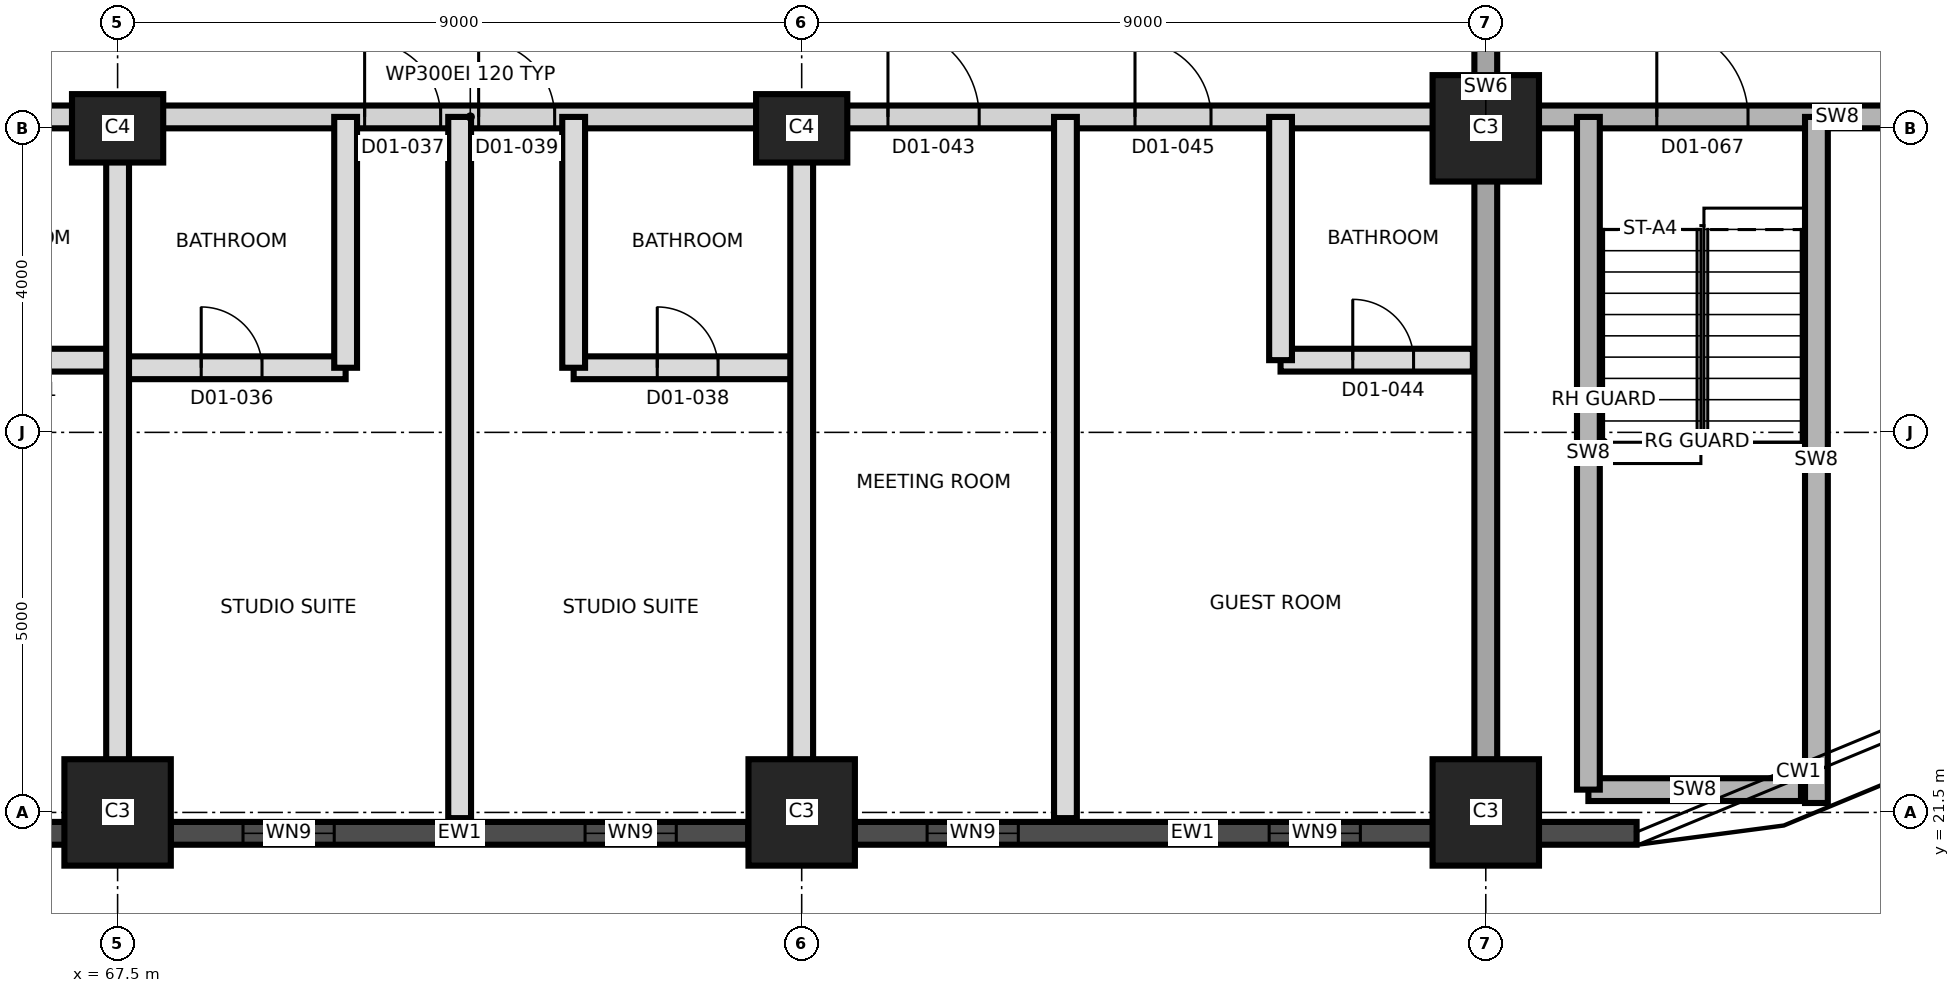
"""IFC4 building model, lengths in metres.
Left out: names, types, materials, properties, quantities, classifications, styles, units other than length and angle.
Written with IfcOpenShell. Run it as: python <this file> out.ifc"""

import sys

from ifc_helpers import new_model, si_unit, direction, frame, frame_2d, origin, origin_2d, place, context, subcontext, project, spatial, rectangle, extrude, element, fill, save


model = new_model("IFC4")
c1 = context("Model", 3, precision=1e-05, world=origin(), true_north=direction((0.0, 1.0)))
c2 = subcontext(c1, "Body", "Model", "MODEL_VIEW")
j1 = project(units=[si_unit("LENGTHUNIT", "METRE"), si_unit("PLANEANGLEUNIT", "RADIAN")], contexts=[c1])
p1 = place(None, origin())
s1 = spatial("IfcSite", under=j1, at=p1, CompositionType="ELEMENT")
p2 = place(p1, origin())
s2 = spatial("IfcBuilding", under=s1, at=p2, CompositionType="ELEMENT")
p3 = place(p2, frame((0.0, 0.0, 37.2)))
s3 = spatial("IfcBuildingStorey", under=s2, at=p3, CompositionType="ELEMENT", Elevation=37.2)
for number, where, z_axis, x_axis in (
    (1, (67.5, 21.5, 0.0), (0.0, 0.0, 1.0), (1.0, 0.0, 0.0)),
    (2, (76.5, 21.5, 0.0), (0.0, 0.0, 1.0), (1.0, 0.0, 0.0)),
    (3, (85.5, 21.5, 0.0), (0.0, 0.0, 1.0), (1.0, 0.0, 0.0)),
):
    element("IfcColumn", number, at=place(p3, frame(where, z_axis=z_axis, x_axis=x_axis)), inside=s3, PredefinedType="COLUMN", context=c2, shape_type="SweptSolid", body=[
        extrude(rectangle(XDim=1.4, YDim=1.4, at=origin_2d()), origin(), (0.0, 0.0, 1.0), 3.7),
    ])
for number, where, z_axis, x_axis in (
    (4, (67.5, 30.5, 0.0), (0.0, 0.0, 1.0), (1.0, 0.0, 0.0)),
    (5, (76.5, 30.5, 0.0), (0.0, 0.0, 1.0), (1.0, 0.0, 0.0)),
):
    element("IfcColumn", number, at=place(p3, frame(where, z_axis=z_axis, x_axis=x_axis)), inside=s3, PredefinedType="COLUMN", context=c2, shape_type="SweptSolid", body=[
        extrude(rectangle(XDim=1.2, YDim=0.9, at=origin_2d()), origin(), (0.0, 0.0, 1.0), 3.7),
    ])
p4 = place(p3, frame((85.5, 30.5, 0.0), z_axis=(0.0, 0.0, 1.0), x_axis=(1.0, 0.0, 0.0)))
e6 = element("IfcColumn", 6, at=p4, inside=s3, PredefinedType="COLUMN", context=c2, shape_type="SweptSolid", body=[
    extrude(rectangle(XDim=1.4, YDim=1.4, at=origin_2d()), origin(), (0.0, 0.0, 1.0), 3.7),
])
p5 = place(p3, frame((85.5, 21.425, 0.0), z_axis=(0.0, 0.0, 1.0), x_axis=(0.0, 1.0, 0.0)))
e7 = element("IfcWall", 7, at=p5, inside=s3, PredefinedType="SHEAR", context=c2, shape_type="SweptSolid", body=[
    extrude(rectangle(XDim=18.15, YDim=0.3, at=frame_2d((9.075, 0.0))), origin(), (0.0, 0.0, 1.0), 3.7),
])
p6 = place(p5, frame((10.275, 0.0, 0.0)))
e8 = element("IfcOpeningElement", 8, at=p6, cuts=e7, PredefinedType="OPENING", context=c2, shape_type="SweptSolid", body=[
    extrude(rectangle(XDim=1.4, YDim=2.1, at=frame_2d((0.7, 1.05))), frame((0.0, 0.16, 0.0), z_axis=(0.0, -1.0, 0.0), x_axis=(1.0, 0.0, 0.0)), (0.0, 0.0, 1.0), 0.32),
])
p7 = place(p3, frame((59.207, 21.225, 0.0), z_axis=(0.0, 0.0, 1.0), x_axis=(1.0, 0.0, 0.0)))
e9 = element("IfcWall", 9, at=p7, inside=s3, PredefinedType="SOLIDWALL", context=c2, shape_type="SweptSolid", body=[
    extrude(rectangle(XDim=8.993, YDim=0.3, at=frame_2d((4.497, 0.0))), origin(), (0.0, 0.0, 1.0), 3.4),
])
p8 = place(p7, frame((0.997, 0.0, 0.3)))
e10 = element("IfcOpeningElement", 10, at=p8, cuts=e9, PredefinedType="OPENING", context=c2, shape_type="SweptSolid", body=[
    extrude(rectangle(XDim=1.8, YDim=2.4, at=frame_2d((0.9, 1.2))), frame((0.0, 0.16, 0.0), z_axis=(0.0, -1.0, 0.0), x_axis=(1.0, 0.0, 0.0)), (0.0, 0.0, 1.0), 0.32),
])
p9 = place(p7, frame((5.443, 0.0, 0.9)))
e11 = element("IfcOpeningElement", 11, at=p9, cuts=e9, PredefinedType="OPENING", context=c2, shape_type="SweptSolid", body=[
    extrude(rectangle(XDim=1.2, YDim=1.5, at=frame_2d((0.6, 0.75))), frame((0.0, 0.16, 0.0), z_axis=(0.0, -1.0, 0.0), x_axis=(1.0, 0.0, 0.0)), (0.0, 0.0, 1.0), 0.32),
])
p10 = place(p3, frame((68.2, 21.225, 0.0), z_axis=(0.0, 0.0, 1.0), x_axis=(1.0, 0.0, 0.0)))
e12 = element("IfcWall", 12, at=p10, inside=s3, PredefinedType="SOLIDWALL", context=c2, shape_type="SweptSolid", body=[
    extrude(rectangle(XDim=7.6, YDim=0.3, at=frame_2d((3.8, 0.0))), origin(), (0.0, 0.0, 1.0), 2.7),
])
p11 = place(p10, frame((0.95, 0.0, 0.9)))
e13 = element("IfcOpeningElement", 13, at=p11, cuts=e12, PredefinedType="OPENING", context=c2, shape_type="SweptSolid", body=[
    extrude(rectangle(XDim=1.2, YDim=1.5, at=frame_2d((0.6, 0.75))), frame((0.0, 0.16, 0.0), z_axis=(0.0, -1.0, 0.0), x_axis=(1.0, 0.0, 0.0)), (0.0, 0.0, 1.0), 0.32),
])
p12 = place(p10, frame((5.45, 0.0, 0.9)))
e14 = element("IfcOpeningElement", 14, at=p12, cuts=e12, PredefinedType="OPENING", context=c2, shape_type="SweptSolid", body=[
    extrude(rectangle(XDim=1.2, YDim=1.5, at=frame_2d((0.6, 0.75))), frame((0.0, 0.16, 0.0), z_axis=(0.0, -1.0, 0.0), x_axis=(1.0, 0.0, 0.0)), (0.0, 0.0, 1.0), 0.32),
])
p13 = place(p3, frame((75.8, 21.225, 0.0), z_axis=(0.0, 0.0, 1.0), x_axis=(1.0, 0.0, 0.0)))
e15 = element("IfcWall", 15, at=p13, inside=s3, PredefinedType="SOLIDWALL", context=c2, shape_type="SweptSolid", body=[
    extrude(rectangle(XDim=11.684, YDim=0.3, at=frame_2d((5.842, 0.0))), origin(), (0.0, 0.0, 1.0), 3.4),
])
p14 = place(p13, frame((2.35, 0.0, 0.9)))
e16 = element("IfcOpeningElement", 16, at=p14, cuts=e15, PredefinedType="OPENING", context=c2, shape_type="SweptSolid", body=[
    extrude(rectangle(XDim=1.2, YDim=1.5, at=frame_2d((0.6, 0.75))), frame((0.0, 0.16, 0.0), z_axis=(0.0, -1.0, 0.0), x_axis=(1.0, 0.0, 0.0)), (0.0, 0.0, 1.0), 0.32),
])
p15 = place(p13, frame((6.85, 0.0, 0.9)))
e17 = element("IfcOpeningElement", 17, at=p15, cuts=e15, PredefinedType="OPENING", context=c2, shape_type="SweptSolid", body=[
    extrude(rectangle(XDim=1.2, YDim=1.5, at=frame_2d((0.6, 0.75))), frame((0.0, 0.16, 0.0), z_axis=(0.0, -1.0, 0.0), x_axis=(1.0, 0.0, 0.0)), (0.0, 0.0, 1.0), 0.32),
])
p16 = place(p3, frame((86.85, 21.8, 0.0), z_axis=(0.0, 0.0, 1.0), x_axis=(1.0, 0.0, 0.0)))
e18 = element("IfcWall", 18, at=p16, inside=s3, PredefinedType="SHEAR", context=c2, shape_type="SweptSolid", body=[
    extrude(rectangle(XDim=2.797, YDim=0.3, at=frame_2d((1.398, 0.0))), origin(), (0.0, 0.0, 1.0), 3.4),
])
p17 = place(p3, frame((67.5, 27.35, 0.0), z_axis=(0.0, 0.0, 1.0), x_axis=(1.0, 0.0, 0.0)))
e19 = element("IfcWall", 19, at=p17, inside=s3, PredefinedType="PARTITIONING", context=c2, shape_type="SweptSolid", body=[
    extrude(rectangle(XDim=3.0, YDim=0.3, at=frame_2d((1.5, 0.0))), origin(), (0.0, 0.0, 1.0), 3.4),
])
p18 = place(p17, frame((1.1, 0.0, 0.0)))
e20 = element("IfcOpeningElement", 20, at=p18, cuts=e19, PredefinedType="OPENING", context=c2, shape_type="SweptSolid", body=[
    extrude(rectangle(XDim=0.8, YDim=2.1, at=frame_2d((0.4, 1.05))), frame((0.0, 0.16, 0.0), z_axis=(0.0, -1.0, 0.0), x_axis=(1.0, 0.0, 0.0)), (0.0, 0.0, 1.0), 0.32),
])
p19 = place(p3, frame((73.5, 27.35, 0.0), z_axis=(0.0, 0.0, 1.0), x_axis=(1.0, 0.0, 0.0)))
e21 = element("IfcWall", 21, at=p19, inside=s3, PredefinedType="PARTITIONING", context=c2, shape_type="SweptSolid", body=[
    extrude(rectangle(XDim=3.0, YDim=0.3, at=frame_2d((1.5, 0.0))), origin(), (0.0, 0.0, 1.0), 3.4),
])
p20 = place(p19, frame((1.1, 0.0, 0.0)))
e22 = element("IfcOpeningElement", 22, at=p20, cuts=e21, PredefinedType="OPENING", context=c2, shape_type="SweptSolid", body=[
    extrude(rectangle(XDim=0.8, YDim=2.1, at=frame_2d((0.4, 1.05))), frame((0.0, 0.16, 0.0), z_axis=(0.0, -1.0, 0.0), x_axis=(1.0, 0.0, 0.0)), (0.0, 0.0, 1.0), 0.32),
])
p21 = place(p3, frame((64.8, 27.45, 0.0), z_axis=(0.0, 0.0, 1.0), x_axis=(1.0, 0.0, 0.0)))
e23 = element("IfcWall", 23, at=p21, inside=s3, PredefinedType="PARTITIONING", context=c2, shape_type="SweptSolid", body=[
    extrude(rectangle(XDim=2.7, YDim=0.3, at=frame_2d((1.35, 0.0))), origin(), (0.0, 0.0, 1.0), 3.4),
])
p22 = place(p21, frame((0.95, 0.0, 0.0)))
e24 = element("IfcOpeningElement", 24, at=p22, cuts=e23, PredefinedType="OPENING", context=c2, shape_type="SweptSolid", body=[
    extrude(rectangle(XDim=0.8, YDim=2.1, at=frame_2d((0.4, 1.05))), frame((0.0, 0.16, 0.0), z_axis=(0.0, -1.0, 0.0), x_axis=(1.0, 0.0, 0.0)), (0.0, 0.0, 1.0), 0.32),
])
p23 = place(p3, frame((82.8, 27.45, 0.0), z_axis=(0.0, 0.0, 1.0), x_axis=(1.0, 0.0, 0.0)))
e25 = element("IfcWall", 25, at=p23, inside=s3, PredefinedType="PARTITIONING", context=c2, shape_type="SweptSolid", body=[
    extrude(rectangle(XDim=2.53, YDim=0.3, at=frame_2d((1.265, 0.0))), origin(), (0.0, 0.0, 1.0), 3.4),
])
p24 = place(p23, frame((0.95, 0.0, 0.0)))
e26 = element("IfcOpeningElement", 26, at=p24, cuts=e25, PredefinedType="OPENING", context=c2, shape_type="SweptSolid", body=[
    extrude(rectangle(XDim=0.8, YDim=2.1, at=frame_2d((0.4, 1.05))), frame((0.0, 0.16, 0.0), z_axis=(0.0, -1.0, 0.0), x_axis=(1.0, 0.0, 0.0)), (0.0, 0.0, 1.0), 0.32),
])
p25 = place(p3, frame((58.95, 30.65, 0.0), z_axis=(0.0, 0.0, 1.0), x_axis=(1.0, 0.0, 0.0)))
e27 = element("IfcWall", 27, at=p25, inside=s3, PredefinedType="PARTITIONING", context=c2, shape_type="SweptSolid", body=[
    extrude(rectangle(XDim=26.38, YDim=0.3, at=frame_2d((13.19, 0.0))), origin(), (0.0, 0.0, 1.0), 3.4),
])
p26 = place(p25, frame((2.47, 0.0, 0.0)))
e28 = element("IfcOpeningElement", 28, at=p26, cuts=e27, PredefinedType="OPENING", context=c2, shape_type="SweptSolid", body=[
    extrude(rectangle(XDim=1.0, YDim=2.1, at=frame_2d((0.5, 1.05))), frame((0.0, 0.16, 0.0), z_axis=(0.0, -1.0, 0.0), x_axis=(1.0, 0.0, 0.0)), (0.0, 0.0, 1.0), 0.32),
])
p27 = place(p25, frame((4.27, 0.0, 0.0)))
e29 = element("IfcOpeningElement", 29, at=p27, cuts=e27, PredefinedType="OPENING", context=c2, shape_type="SweptSolid", body=[
    extrude(rectangle(XDim=1.0, YDim=2.1, at=frame_2d((0.5, 1.05))), frame((0.0, 0.16, 0.0), z_axis=(0.0, -1.0, 0.0), x_axis=(1.0, 0.0, 0.0)), (0.0, 0.0, 1.0), 0.32),
])
p28 = place(p25, frame((11.8, 0.0, 0.0)))
e30 = element("IfcOpeningElement", 30, at=p28, cuts=e27, PredefinedType="OPENING", context=c2, shape_type="SweptSolid", body=[
    extrude(rectangle(XDim=1.0, YDim=2.4, at=frame_2d((0.5, 1.2))), frame((0.0, 0.16, 0.0), z_axis=(0.0, -1.0, 0.0), x_axis=(1.0, 0.0, 0.0)), (0.0, 0.0, 1.0), 0.32),
])
p29 = place(p25, frame((13.3, 0.0, 0.0)))
e31 = element("IfcOpeningElement", 31, at=p29, cuts=e27, PredefinedType="OPENING", context=c2, shape_type="SweptSolid", body=[
    extrude(rectangle(XDim=1.0, YDim=2.4, at=frame_2d((0.5, 1.2))), frame((0.0, 0.16, 0.0), z_axis=(0.0, -1.0, 0.0), x_axis=(1.0, 0.0, 0.0)), (0.0, 0.0, 1.0), 0.32),
])
p30 = place(p25, frame((18.685, 0.0, 0.0)))
e32 = element("IfcOpeningElement", 32, at=p30, cuts=e27, PredefinedType="OPENING", context=c2, shape_type="SweptSolid", body=[
    extrude(rectangle(XDim=1.2, YDim=2.1, at=frame_2d((0.6, 1.05))), frame((0.0, 0.16, 0.0), z_axis=(0.0, -1.0, 0.0), x_axis=(1.0, 0.0, 0.0)), (0.0, 0.0, 1.0), 0.32),
])
p31 = place(p25, frame((21.935, 0.0, 0.0)))
e33 = element("IfcOpeningElement", 33, at=p31, cuts=e27, PredefinedType="OPENING", context=c2, shape_type="SweptSolid", body=[
    extrude(rectangle(XDim=1.0, YDim=2.1, at=frame_2d((0.5, 1.05))), frame((0.0, 0.16, 0.0), z_axis=(0.0, -1.0, 0.0), x_axis=(1.0, 0.0, 0.0)), (0.0, 0.0, 1.0), 0.32),
])
p32 = place(p3, frame((85.67, 30.65, 0.0), z_axis=(0.0, 0.0, 1.0), x_axis=(1.0, 0.0, 0.0)))
e34 = element("IfcWall", 34, at=p32, inside=s3, PredefinedType="SHEAR", context=c2, shape_type="SweptSolid", body=[
    extrude(rectangle(XDim=8.905, YDim=0.3, at=frame_2d((4.453, 0.0))), origin(), (0.0, 0.0, 1.0), 3.4),
])
p33 = place(p32, frame((2.08, 0.0, 0.0)))
e35 = element("IfcOpeningElement", 35, at=p33, cuts=e34, PredefinedType="OPENING", context=c2, shape_type="SweptSolid", body=[
    extrude(rectangle(XDim=1.2, YDim=2.1, at=frame_2d((0.6, 1.05))), frame((0.0, 0.16, 0.0), z_axis=(0.0, -1.0, 0.0), x_axis=(1.0, 0.0, 0.0)), (0.0, 0.0, 1.0), 0.32),
])
p34 = place(p32, frame((5.63, 0.0, 0.0)))
e36 = element("IfcOpeningElement", 36, at=p34, cuts=e34, PredefinedType="OPENING", context=c2, shape_type="SweptSolid", body=[
    extrude(rectangle(XDim=1.0, YDim=2.1, at=frame_2d((0.5, 1.05))), frame((0.0, 0.16, 0.0), z_axis=(0.0, -1.0, 0.0), x_axis=(1.0, 0.0, 0.0)), (0.0, 0.0, 1.0), 0.32),
])
p35 = place(p3, frame((67.5, 21.425, 0.0), z_axis=(0.0, 0.0, 1.0), x_axis=(0.0, 1.0, 0.0)))
e37 = element("IfcWall", 37, at=p35, inside=s3, PredefinedType="PARTITIONING", context=c2, shape_type="SweptSolid", body=[
    extrude(rectangle(XDim=9.225, YDim=0.3, at=frame_2d((4.612, 0.0))), origin(), (0.0, 0.0, 1.0), 3.4),
])
p36 = place(p3, frame((70.5, 27.35, 0.0), z_axis=(0.0, 0.0, 1.0), x_axis=(0.0, 1.0, 0.0)))
e38 = element("IfcWall", 38, at=p36, inside=s3, PredefinedType="PARTITIONING", context=c2, shape_type="SweptSolid", body=[
    extrude(rectangle(XDim=3.3, YDim=0.3, at=frame_2d((1.65, 0.0))), origin(), (0.0, 0.0, 1.0), 3.4),
])
p37 = place(p3, frame((72.0, 21.425, 0.0), z_axis=(0.0, 0.0, 1.0), x_axis=(0.0, 1.0, 0.0)))
e39 = element("IfcWall", 39, at=p37, inside=s3, PredefinedType="PARTITIONING", context=c2, shape_type="SweptSolid", body=[
    extrude(rectangle(XDim=9.225, YDim=0.3, at=frame_2d((4.612, 0.0))), origin(), (0.0, 0.0, 1.0), 3.4),
])
p38 = place(p3, frame((73.5, 27.35, 0.0), z_axis=(0.0, 0.0, 1.0), x_axis=(0.0, 1.0, 0.0)))
e40 = element("IfcWall", 40, at=p38, inside=s3, PredefinedType="PARTITIONING", context=c2, shape_type="SweptSolid", body=[
    extrude(rectangle(XDim=3.3, YDim=0.3, at=frame_2d((1.65, 0.0))), origin(), (0.0, 0.0, 1.0), 3.4),
])
for number, where, z_axis, x_axis in (
    (41, (76.5, 21.425, 0.0), (0.0, 0.0, 1.0), (0.0, 1.0, 0.0)),
    (42, (79.97, 21.425, 0.0), (0.0, 0.0, 1.0), (0.0, 1.0, 0.0)),
):
    element("IfcWall", number, at=place(p3, frame(where, z_axis=z_axis, x_axis=x_axis)), inside=s3, PredefinedType="PARTITIONING", context=c2, shape_type="SweptSolid", body=[
        extrude(rectangle(XDim=9.225, YDim=0.3, at=frame_2d((4.612, 0.0))), origin(), (0.0, 0.0, 1.0), 3.4),
    ])
p39 = place(p3, frame((82.8, 27.45, 0.0), z_axis=(0.0, 0.0, 1.0), x_axis=(0.0, 1.0, 0.0)))
e43 = element("IfcWall", 43, at=p39, inside=s3, PredefinedType="PARTITIONING", context=c2, shape_type="SweptSolid", body=[
    extrude(rectangle(XDim=3.2, YDim=0.3, at=frame_2d((1.6, 0.0))), origin(), (0.0, 0.0, 1.0), 3.4),
])
p40 = place(p3, frame((86.85, 21.8, 0.0), z_axis=(0.0, 0.0, 1.0), x_axis=(0.0, 1.0, 0.0)))
e44 = element("IfcWall", 44, at=p40, inside=s3, PredefinedType="SHEAR", context=c2, shape_type="SweptSolid", body=[
    extrude(rectangle(XDim=8.85, YDim=0.3, at=frame_2d((4.425, 0.0))), origin(), (0.0, 0.0, 1.0), 3.4),
])
p41 = place(p3, frame((89.85, 21.624, 0.0), z_axis=(0.0, 0.0, 1.0), x_axis=(0.0, 1.0, 0.0)))
e45 = element("IfcWall", 45, at=p41, inside=s3, PredefinedType="SHEAR", context=c2, shape_type="SweptSolid", body=[
    extrude(rectangle(XDim=9.026, YDim=0.3, at=frame_2d((4.513, 0.0))), origin(), (0.0, 0.0, 1.0), 3.4),
])
p42 = place(p11, origin())
e46 = element("IfcWindow", 46, at=p42, inside=s3, PartitioningType="SINGLE_PANEL", PredefinedType="WINDOW", context=c2, shape_type="SweptSolid", body=[
    extrude(rectangle(XDim=1.2, YDim=1.5, at=frame_2d((0.6, 0.75))), frame((0.0, 0.03, 0.0), z_axis=(0.0, -1.0, 0.0), x_axis=(1.0, 0.0, 0.0)), (0.0, 0.0, 1.0), 0.06),
])
fill(e13, e46)
p43 = place(p12, origin())
e47 = element("IfcWindow", 47, at=p43, inside=s3, PartitioningType="SINGLE_PANEL", PredefinedType="WINDOW", context=c2, shape_type="SweptSolid", body=[
    extrude(rectangle(XDim=1.2, YDim=1.5, at=frame_2d((0.6, 0.75))), frame((0.0, 0.03, 0.0), z_axis=(0.0, -1.0, 0.0), x_axis=(1.0, 0.0, 0.0)), (0.0, 0.0, 1.0), 0.06),
])
fill(e14, e47)
p44 = place(p14, origin())
e48 = element("IfcWindow", 48, at=p44, inside=s3, PartitioningType="SINGLE_PANEL", PredefinedType="WINDOW", context=c2, shape_type="SweptSolid", body=[
    extrude(rectangle(XDim=1.2, YDim=1.5, at=frame_2d((0.6, 0.75))), frame((0.0, 0.03, 0.0), z_axis=(0.0, -1.0, 0.0), x_axis=(1.0, 0.0, 0.0)), (0.0, 0.0, 1.0), 0.06),
])
fill(e16, e48)
p45 = place(p15, origin())
e49 = element("IfcWindow", 49, at=p45, inside=s3, PartitioningType="SINGLE_PANEL", PredefinedType="WINDOW", context=c2, shape_type="SweptSolid", body=[
    extrude(rectangle(XDim=1.2, YDim=1.5, at=frame_2d((0.6, 0.75))), frame((0.0, 0.03, 0.0), z_axis=(0.0, -1.0, 0.0), x_axis=(1.0, 0.0, 0.0)), (0.0, 0.0, 1.0), 0.06),
])
fill(e17, e49)
p46 = place(p18, origin())
e50 = element("IfcDoor", 50, at=p46, inside=s3, OperationType="SINGLE_SWING_LEFT", PredefinedType="DOOR", context=c2, shape_type="SweptSolid", body=[
    extrude(rectangle(XDim=0.8, YDim=2.1, at=frame_2d((0.4, 1.05))), frame((0.0, 0.025, 0.0), z_axis=(0.0, -1.0, 0.0), x_axis=(1.0, 0.0, 0.0)), (0.0, 0.0, 1.0), 0.05),
])
fill(e20, e50)
p47 = place(p28, origin())
e51 = element("IfcDoor", 51, at=p47, inside=s3, OperationType="SINGLE_SWING_LEFT", PredefinedType="DOOR", context=c2, shape_type="SweptSolid", body=[
    extrude(rectangle(XDim=1.0, YDim=2.4, at=frame_2d((0.5, 1.2))), frame((0.0, 0.025, 0.0), z_axis=(0.0, -1.0, 0.0), x_axis=(1.0, 0.0, 0.0)), (0.0, 0.0, 1.0), 0.05),
])
fill(e30, e51)
p48 = place(p20, origin())
e52 = element("IfcDoor", 52, at=p48, inside=s3, OperationType="SINGLE_SWING_LEFT", PredefinedType="DOOR", context=c2, shape_type="SweptSolid", body=[
    extrude(rectangle(XDim=0.8, YDim=2.1, at=frame_2d((0.4, 1.05))), frame((0.0, 0.025, 0.0), z_axis=(0.0, -1.0, 0.0), x_axis=(1.0, 0.0, 0.0)), (0.0, 0.0, 1.0), 0.05),
])
fill(e22, e52)
p49 = place(p29, origin())
e53 = element("IfcDoor", 53, at=p49, inside=s3, OperationType="SINGLE_SWING_RIGHT", PredefinedType="DOOR", context=c2, shape_type="SweptSolid", body=[
    extrude(rectangle(XDim=1.0, YDim=2.4, at=frame_2d((0.5, 1.2))), frame((0.0, 0.025, 0.0), z_axis=(0.0, -1.0, 0.0), x_axis=(1.0, 0.0, 0.0)), (0.0, 0.0, 1.0), 0.05),
])
fill(e31, e53)
p50 = place(p30, origin())
e54 = element("IfcDoor", 54, at=p50, inside=s3, OperationType="SINGLE_SWING_LEFT", PredefinedType="DOOR", context=c2, shape_type="SweptSolid", body=[
    extrude(rectangle(XDim=1.2, YDim=2.1, at=frame_2d((0.6, 1.05))), frame((0.0, 0.025, 0.0), z_axis=(0.0, -1.0, 0.0), x_axis=(1.0, 0.0, 0.0)), (0.0, 0.0, 1.0), 0.05),
])
fill(e32, e54)
p51 = place(p24, origin())
e55 = element("IfcDoor", 55, at=p51, inside=s3, OperationType="SINGLE_SWING_LEFT", PredefinedType="DOOR", context=c2, shape_type="SweptSolid", body=[
    extrude(rectangle(XDim=0.8, YDim=2.1, at=frame_2d((0.4, 1.05))), frame((0.0, 0.025, 0.0), z_axis=(0.0, -1.0, 0.0), x_axis=(1.0, 0.0, 0.0)), (0.0, 0.0, 1.0), 0.05),
])
fill(e26, e55)
p52 = place(p31, origin())
e56 = element("IfcDoor", 56, at=p52, inside=s3, OperationType="SINGLE_SWING_RIGHT", PredefinedType="DOOR", context=c2, shape_type="SweptSolid", body=[
    extrude(rectangle(XDim=1.0, YDim=2.1, at=frame_2d((0.5, 1.05))), frame((0.0, 0.025, 0.0), z_axis=(0.0, -1.0, 0.0), x_axis=(1.0, 0.0, 0.0)), (0.0, 0.0, 1.0), 0.05),
])
fill(e33, e56)
p53 = place(p33, origin())
e57 = element("IfcDoor", 57, at=p53, inside=s3, OperationType="SINGLE_SWING_LEFT", PredefinedType="DOOR", context=c2, shape_type="SweptSolid", body=[
    extrude(rectangle(XDim=1.2, YDim=2.1, at=frame_2d((0.6, 1.05))), frame((0.0, 0.025, 0.0), z_axis=(0.0, -1.0, 0.0), x_axis=(1.0, 0.0, 0.0)), (0.0, 0.0, 1.0), 0.05),
])
fill(e35, e57)
save(model, sys.argv[1])
